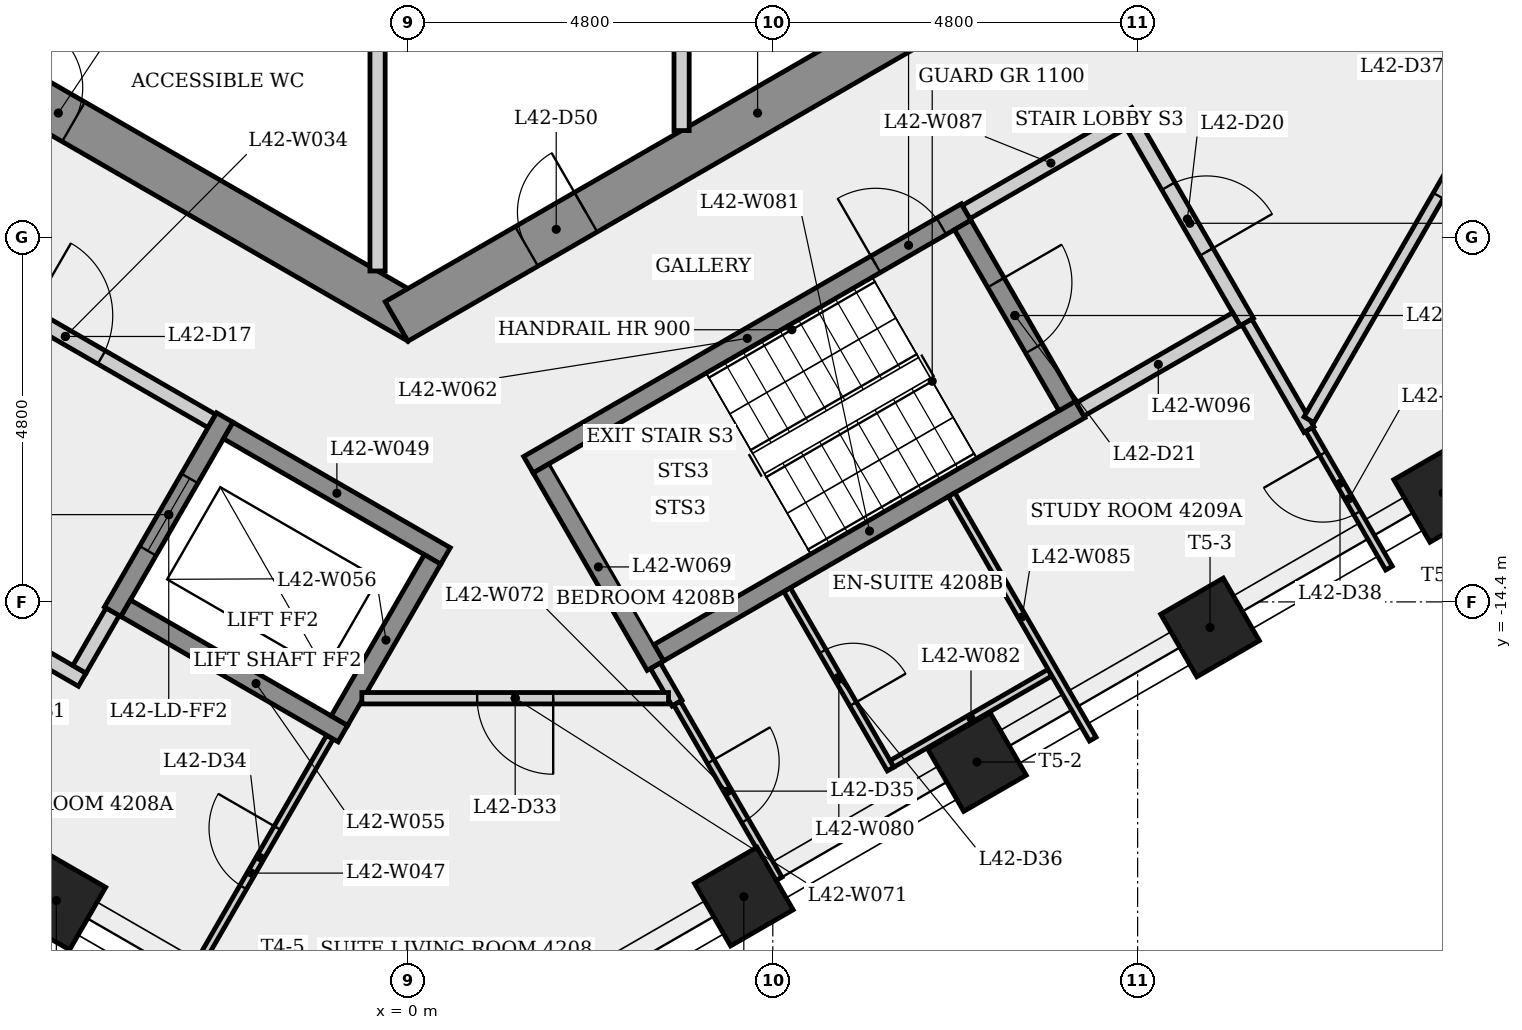
"""IFC4 building model, lengths in metres.
Left out: names, types, materials, properties, quantities, classifications, styles, units other than length and angle.
Written with IfcOpenShell. Run it as: python <this file> out.ifc"""

import sys

from ifc_helpers import new_model, si_unit, direction, frame, frame_2d, origin, origin_2d, place, context, subcontext, project, spatial, rectangle, extrude, element, fill, save


model = new_model("IFC4")
c1 = context("Model", 3, precision=1e-05, world=origin(), true_north=direction((0.0, 1.0)))
c2 = subcontext(c1, "Body", "Model", "MODEL_VIEW")
j1 = project(units=[si_unit("LENGTHUNIT", "METRE"), si_unit("PLANEANGLEUNIT", "RADIAN")], contexts=[c1])
p1 = place(None, origin())
s1 = spatial("IfcSite", under=j1, at=p1, CompositionType="ELEMENT")
p2 = place(p1, origin())
s2 = spatial("IfcBuilding", under=s1, at=p2, CompositionType="ELEMENT")
p3 = place(p2, frame((0.0, 0.0, 159.5)))
s3 = spatial("IfcBuildingStorey", under=s2, at=p3, CompositionType="ELEMENT", Elevation=159.5)
p4 = place(p3, frame((-9.35, -5.225, 0.0), z_axis=(0.0, 0.0, 1.0), x_axis=(0.866023993627, -0.500002442456, 0.0)))
e1 = element("IfcWall", 1, at=p4, inside=s3, PredefinedType="SHEAR", context=c2, shape_type="SweptSolid", body=[
    extrude(rectangle(XDim=10.97, YDim=0.6, at=frame_2d((5.485, 0.0))), origin(), (0.0, 0.0, 1.0), 3.4),
])
p5 = place(p4, frame((4.816, 0.0, 0.0)))
e2 = element("IfcOpeningElement", 2, at=p5, cuts=e1, PredefinedType="OPENING", context=c2, shape_type="SweptSolid", body=[
    extrude(rectangle(XDim=0.9, YDim=2.1, at=frame_2d((0.45, 1.05))), frame((0.0, 0.31, 0.0), z_axis=(0.0, -1.0, 0.0), x_axis=(1.0, 0.0, 0.0)), (0.0, 0.0, 1.0), 0.62),
])
p6 = place(p3, frame((-0.15, -10.71, 0.0), z_axis=(0.0, 0.0, 1.0), x_axis=(0.866023993627, 0.500002442456, 0.0)))
e3 = element("IfcWall", 3, at=p6, inside=s3, PredefinedType="SHEAR", context=c2, shape_type="SweptSolid", body=[
    extrude(rectangle(XDim=10.97, YDim=0.6, at=frame_2d((5.485, 0.0))), origin(), (0.0, 0.0, 1.0), 3.4),
])
p7 = place(p6, frame((1.975, 0.0, 0.0)))
e4 = element("IfcOpeningElement", 4, at=p7, cuts=e3, PredefinedType="OPENING", context=c2, shape_type="SweptSolid", body=[
    extrude(rectangle(XDim=0.9, YDim=2.1, at=frame_2d((0.45, 1.05))), frame((0.0, 0.31, 0.0), z_axis=(0.0, -1.0, 0.0), x_axis=(1.0, 0.0, 0.0)), (0.0, 0.0, 1.0), 0.62),
])
p8 = place(p6, frame((8.782, 0.0, 0.0)))
e5 = element("IfcOpeningElement", 5, at=p8, cuts=e3, PredefinedType="OPENING", context=c2, shape_type="SweptSolid", body=[
    extrude(rectangle(XDim=0.9, YDim=2.1, at=frame_2d((0.45, 1.05))), frame((0.0, 0.31, 0.0), z_axis=(0.0, -1.0, 0.0), x_axis=(1.0, 0.0, 0.0)), (0.0, 0.0, 1.0), 0.62),
])
for number, where, z_axis, x_axis in (
    (6, (-4.626, -18.329, 0.0), (0.0, 0.0, 1.0), (-0.5, -0.866, 0.0)),
    (7, (4.419, -18.278, 0.0), (0.0, 0.0, 1.0), (0.5, -0.866, 0.0)),
    (8, (7.486, -16.507, 0.0), (0.0, 0.0, 1.0), (0.5, -0.866, 0.0)),
    (9, (10.552, -14.736, 0.0), (0.0, 0.0, 1.0), (0.5, -0.866, 0.0)),
    (10, (13.62, -12.965, 0.0), (0.0, 0.0, 1.0), (0.5, -0.866, 0.0)),
):
    element("IfcColumn", number, at=place(p3, frame(where, z_axis=z_axis, x_axis=x_axis)), inside=s3, PredefinedType="COLUMN", context=c2, shape_type="SweptSolid", body=[
        extrude(rectangle(XDim=0.95, YDim=0.95, at=origin_2d()), origin(), (0.0, 0.0, 1.0), 3.4),
    ])
p9 = place(p3, frame((-6.435, -9.795, 0.0), z_axis=(0.0, 0.0, 1.0), x_axis=(0.866012907634, -0.500021643343, 0.0)))
e11 = element("IfcWall", 11, at=p9, inside=s3, PredefinedType="PARTITIONING", context=c2, shape_type="SweptSolid", body=[
    extrude(rectangle(XDim=4.45, YDim=0.2, at=frame_2d((2.225, 0.0))), origin(), (0.0, 0.0, 1.0), 3.05),
])
p10 = place(p9, frame((1.675, 0.0, 0.0)))
e12 = element("IfcOpeningElement", 12, at=p10, cuts=e11, PredefinedType="OPENING", context=c2, shape_type="SweptSolid", body=[
    extrude(rectangle(XDim=1.1, YDim=2.1, at=frame_2d((0.55, 1.05))), frame((0.0, 0.11, 0.0), z_axis=(0.0, -1.0, 0.0), x_axis=(1.0, 0.0, 0.0)), (0.0, 0.0, 1.0), 0.22),
])
p11 = place(p3, frame((-4.286, -15.423, 0.0), z_axis=(0.0, 0.0, 1.0), x_axis=(-0.866042777325, 0.499969906938, 0.0)))
e13 = element("IfcWall", 13, at=p11, inside=s3, PredefinedType="PARTITIONING", context=c2, shape_type="SweptSolid", body=[
    extrude(rectangle(XDim=3.9, YDim=0.2, at=frame_2d((1.95, 0.0))), origin(), (0.0, 0.0, 1.0), 3.05),
])
p12 = place(p3, frame((-3.885, -14.529, 0.0), z_axis=(0.0, 0.0, 1.0), x_axis=(-0.499859285417, -0.866106630146, 0.0)))
e14 = element("IfcWall", 14, at=p12, inside=s3, PredefinedType="PARTITIONING", context=c2, shape_type="SweptSolid", body=[
    extrude(rectangle(XDim=0.875, YDim=0.2, at=frame_2d((0.438, 0.0))), origin(), (0.0, 0.0, 1.0), 3.05),
])
p13 = place(p3, frame((-3.094, -19.758, 0.0), z_axis=(0.0, 0.0, 1.0), x_axis=(0.500027577057, 0.866009481578, 0.0)))
e15 = element("IfcWall", 15, at=p13, inside=s3, PredefinedType="PARTITIONING", context=c2, shape_type="SweptSolid", body=[
    extrude(rectangle(XDim=4.133, YDim=0.1, at=frame_2d((2.066, 0.0))), origin(), (0.0, 0.0, 1.0), 3.05),
])
p14 = place(p13, frame((1.852, 0.0, 0.0)))
e16 = element("IfcOpeningElement", 16, at=p14, cuts=e15, PredefinedType="OPENING", context=c2, shape_type="SweptSolid", body=[
    extrude(rectangle(XDim=0.9, YDim=2.1, at=frame_2d((0.45, 1.05))), frame((0.0, 0.06, 0.0), z_axis=(0.0, -1.0, 0.0), x_axis=(1.0, 0.0, 0.0)), (0.0, 0.0, 1.0), 0.12),
])
p15 = place(p3, frame((-2.41, -11.974, 0.0), z_axis=(0.0, 0.0, 1.0), x_axis=(-0.500001826776, -0.866024349092, 0.0)))
e17 = element("IfcWall", 17, at=p15, inside=s3, PredefinedType="SHEAR", context=c2, shape_type="SweptSolid", body=[
    extrude(rectangle(XDim=2.95, YDim=0.25, at=frame_2d((1.475, 0.0))), origin(), (0.0, 0.0, 1.0), 3.05),
])
p16 = place(p15, frame((0.925, 0.0, 0.0)))
e18 = element("IfcOpeningElement", 18, at=p16, cuts=e17, PredefinedType="OPENING", context=c2, shape_type="SweptSolid", body=[
    extrude(rectangle(XDim=1.1, YDim=2.1, at=frame_2d((0.55, 1.05))), frame((0.0, 0.135, 0.0), z_axis=(0.0, -1.0, 0.0), x_axis=(1.0, 0.0, 0.0)), (0.0, 0.0, 1.0), 0.27),
])
p17 = place(p3, frame((-2.364, -12.145, 0.0), z_axis=(0.0, 0.0, 1.0), x_axis=(0.866040211805, -0.499974350878, 0.0)))
e19 = element("IfcWall", 19, at=p17, inside=s3, PredefinedType="SHEAR", context=c2, shape_type="SweptSolid", body=[
    extrude(rectangle(XDim=3.3, YDim=0.25, at=frame_2d((1.65, 0.0))), origin(), (0.0, 0.0, 1.0), 3.05),
])
p18 = place(p3, frame((-0.856, -16.133, 0.0), z_axis=(0.0, 0.0, 1.0), x_axis=(-0.866021716278, 0.500006386895, 0.0)))
e20 = element("IfcWall", 20, at=p18, inside=s3, PredefinedType="SHEAR", context=c2, shape_type="SweptSolid", body=[
    extrude(rectangle(XDim=3.3, YDim=0.25, at=frame_2d((1.65, 0.0))), origin(), (0.0, 0.0, 1.0), 3.05),
])
p19 = place(p3, frame((-0.902, -15.962, 0.0), z_axis=(0.0, 0.0, 1.0), x_axis=(0.500061746146, 0.865989751695, 0.0)))
e21 = element("IfcWall", 21, at=p19, inside=s3, PredefinedType="SHEAR", context=c2, shape_type="SweptSolid", body=[
    extrude(rectangle(XDim=2.45, YDim=0.25, at=frame_2d((1.225, 0.0))), origin(), (0.0, 0.0, 1.0), 3.4),
])
p20 = place(p3, frame((-0.4, -5.25, 0.0), z_axis=(0.0, 0.0, 1.0), x_axis=(0.0, -1.0, 0.0)))
e22 = element("IfcWall", 22, at=p20, inside=s3, PredefinedType="PARTITIONING", context=c2, shape_type="SweptSolid", body=[
    extrude(rectangle(XDim=4.796, YDim=0.2, at=frame_2d((2.398, 0.0))), origin(), (0.0, 0.0, 1.0), 3.05),
])
p21 = place(p3, frame((1.585, -12.595, 0.0), z_axis=(0.0, 0.0, 1.0), x_axis=(0.866036417653, 0.499980922934, 0.0)))
e23 = element("IfcWall", 23, at=p21, inside=s3, PredefinedType="SHEAR", context=c2, shape_type="SweptSolid", body=[
    extrude(rectangle(XDim=6.65, YDim=0.25, at=frame_2d((3.325, 0.0))), origin(), (0.0, 0.0, 1.0), 3.05),
])
p22 = place(p21, frame((5.275, 0.0, 0.0)))
e24 = element("IfcOpeningElement", 24, at=p22, cuts=e23, PredefinedType="OPENING", context=c2, shape_type="SweptSolid", body=[
    extrude(rectangle(XDim=1.0, YDim=2.1, at=frame_2d((0.5, 1.05))), frame((0.0, 0.135, 0.0), z_axis=(0.0, -1.0, 0.0), x_axis=(1.0, 0.0, 0.0)), (0.0, 0.0, 1.0), 0.27),
])
p23 = place(p3, frame((3.256, -15.239, 0.0), z_axis=(0.0, 0.0, 1.0), x_axis=(0.49987077196, -0.866100000774, 0.0)))
e25 = element("IfcWall", 25, at=p23, inside=s3, PredefinedType="PARTITIONING", context=c2, shape_type="SweptSolid", body=[
    extrude(rectangle(XDim=0.57, YDim=0.15, at=frame_2d((0.285, 0.0))), origin(), (0.0, 0.0, 1.0), 3.05),
])
p24 = place(p3, frame((3.256, -15.239, 0.0), z_axis=(0.0, 0.0, 1.0), x_axis=(-0.50002537861, 0.866010750942, 0.0)))
e26 = element("IfcWall", 26, at=p24, inside=s3, PredefinedType="SHEAR", context=c2, shape_type="SweptSolid", body=[
    extrude(rectangle(XDim=3.0, YDim=0.25, at=frame_2d((1.5, 0.0))), origin(), (0.0, 0.0, 1.0), 3.05),
])
p25 = place(p3, frame((3.428, -15.667, 0.0), z_axis=(0.0, 0.0, 1.0), x_axis=(-1.0, 0.0, 0.0)))
e27 = element("IfcWall", 27, at=p25, inside=s3, PredefinedType="PARTITIONING", context=c2, shape_type="SweptSolid", body=[
    extrude(rectangle(XDim=4.035, YDim=0.15, at=frame_2d((2.017, 0.0))), origin(), (0.0, 0.0, 1.0), 3.05),
])
p26 = place(p25, frame((1.517, 0.0, 0.0)))
e28 = element("IfcOpeningElement", 28, at=p26, cuts=e27, PredefinedType="OPENING", context=c2, shape_type="SweptSolid", body=[
    extrude(rectangle(XDim=1.0, YDim=2.1, at=frame_2d((0.5, 1.05))), frame((0.0, 0.085, 0.0), z_axis=(0.0, -1.0, 0.0), x_axis=(1.0, 0.0, 0.0)), (0.0, 0.0, 1.0), 0.17),
])
p27 = place(p3, frame((3.541, -15.732, 0.0), z_axis=(0.0, 0.0, 1.0), x_axis=(0.500009734663, -0.866019783401, 0.0)))
e29 = element("IfcWall", 29, at=p27, inside=s3, PredefinedType="PARTITIONING", context=c2, shape_type="SweptSolid", body=[
    extrude(rectangle(XDim=2.673, YDim=0.1, at=frame_2d((1.336, 0.0))), origin(), (0.0, 0.0, 1.0), 3.05),
])
p28 = place(p27, frame((0.886, 0.0, 0.0)))
e30 = element("IfcOpeningElement", 30, at=p28, cuts=e29, PredefinedType="OPENING", context=c2, shape_type="SweptSolid", body=[
    extrude(rectangle(XDim=0.9, YDim=2.1, at=frame_2d((0.45, 1.05))), frame((0.0, 0.06, 0.0), z_axis=(0.0, -1.0, 0.0), x_axis=(1.0, 0.0, 0.0)), (0.0, 0.0, 1.0), 0.12),
])
p29 = place(p3, frame((3.6, -5.275, 0.0), z_axis=(0.0, 0.0, 1.0), x_axis=(0.0, -1.0, 0.0)))
e31 = element("IfcWall", 31, at=p29, inside=s3, PredefinedType="PARTITIONING", context=c2, shape_type="SweptSolid", body=[
    extrude(rectangle(XDim=2.924, YDim=0.2, at=frame_2d((1.462, 0.0))), origin(), (0.0, 0.0, 1.0), 3.05),
])
p30 = place(p3, frame((4.988, -14.239, 0.0), z_axis=(0.0, 0.0, 1.0), x_axis=(0.500022328685, -0.866012511928, 0.0)))
e32 = element("IfcWall", 32, at=p30, inside=s3, PredefinedType="PARTITIONING", context=c2, shape_type="SweptSolid", body=[
    extrude(rectangle(XDim=2.725, YDim=0.1, at=frame_2d((1.363, 0.0))), origin(), (0.0, 0.0, 1.0), 3.05),
])
p31 = place(p30, frame((0.938, 0.0, 0.0)))
e33 = element("IfcOpeningElement", 33, at=p31, cuts=e32, PredefinedType="OPENING", context=c2, shape_type="SweptSolid", body=[
    extrude(rectangle(XDim=0.8, YDim=2.1, at=frame_2d((0.4, 1.05))), frame((0.0, 0.06, 0.0), z_axis=(0.0, -1.0, 0.0), x_axis=(1.0, 0.0, 0.0)), (0.0, 0.0, 1.0), 0.12),
])
p32 = place(p3, frame((3.301, -15.068, 0.0), z_axis=(0.0, 0.0, 1.0), x_axis=(0.866035036182, 0.499983315828, 0.0)))
e34 = element("IfcWall", 34, at=p32, inside=s3, PredefinedType="SHEAR", context=c2, shape_type="SweptSolid", body=[
    extrude(rectangle(XDim=6.4, YDim=0.25, at=frame_2d((3.2, 0.0))), origin(), (0.0, 0.0, 1.0), 3.05),
])
p33 = place(p3, frame((6.368, -16.531, 0.0), z_axis=(0.0, 0.0, 1.0), x_axis=(0.866006032174, 0.500033551112, 0.0)))
e35 = element("IfcWall", 35, at=p33, inside=s3, PredefinedType="PARTITIONING", context=c2, shape_type="SweptSolid", body=[
    extrude(rectangle(XDim=2.4, YDim=0.1, at=frame_2d((1.2, 0.0))), origin(), (0.0, 0.0, 1.0), 3.05),
])
p34 = place(p3, frame((7.153, -12.989, 0.0), z_axis=(0.0, 0.0, 1.0), x_axis=(0.499999386358, -0.86602575807, 0.0)))
e36 = element("IfcWall", 36, at=p34, inside=s3, PredefinedType="PARTITIONING", context=c2, shape_type="SweptSolid", body=[
    extrude(rectangle(XDim=3.714, YDim=0.1, at=frame_2d((1.857, 0.0))), origin(), (0.0, 0.0, 1.0), 3.05),
])
p35 = place(p3, frame((7.298, -9.441, 0.0), z_axis=(0.0, 0.0, 1.0), x_axis=(0.500034990121, -0.866005201286, 0.0)))
e37 = element("IfcWall", 37, at=p35, inside=s3, PredefinedType="SHEAR", context=c2, shape_type="SweptSolid", body=[
    extrude(rectangle(XDim=2.75, YDim=0.25, at=frame_2d((1.375, 0.0))), origin(), (0.0, 0.0, 1.0), 3.05),
])
p36 = place(p35, frame((0.875, 0.0, 0.0)))
e38 = element("IfcOpeningElement", 38, at=p36, cuts=e37, PredefinedType="OPENING", context=c2, shape_type="SweptSolid", body=[
    extrude(rectangle(XDim=1.0, YDim=2.1, at=frame_2d((0.5, 1.05))), frame((0.0, 0.135, 0.0), z_axis=(0.0, -1.0, 0.0), x_axis=(1.0, 0.0, 0.0)), (0.0, 0.0, 1.0), 0.27),
])
p37 = place(p3, frame((7.344, -9.27, 0.0), z_axis=(0.0, 0.0, 1.0), x_axis=(0.866005588531, 0.500034319456, 0.0)))
e39 = element("IfcWall", 39, at=p37, inside=s3, PredefinedType="PARTITIONING", context=c2, shape_type="SweptSolid", body=[
    extrude(rectangle(XDim=2.575, YDim=0.2, at=frame_2d((1.288, 0.0))), origin(), (0.0, 0.0, 1.0), 3.05),
])
p38 = place(p3, frame((9.537, -8.119, 0.0), z_axis=(0.0, 0.0, 1.0), x_axis=(0.499990139034, -0.866031096941, 0.0)))
e40 = element("IfcWall", 40, at=p38, inside=s3, PredefinedType="PARTITIONING", context=c2, shape_type="SweptSolid", body=[
    extrude(rectangle(XDim=3.0, YDim=0.2, at=frame_2d((1.5, 0.0))), origin(), (0.0, 0.0, 1.0), 3.05),
])
p39 = place(p38, frame((0.935, 0.0, 0.0)))
e41 = element("IfcOpeningElement", 41, at=p39, cuts=e40, PredefinedType="OPENING", context=c2, shape_type="SweptSolid", body=[
    extrude(rectangle(XDim=1.0, YDim=2.1, at=frame_2d((0.5, 1.05))), frame((0.0, 0.11, 0.0), z_axis=(0.0, -1.0, 0.0), x_axis=(1.0, 0.0, 0.0)), (0.0, 0.0, 1.0), 0.22),
])
p40 = place(p3, frame((10.901, -10.681, 0.0), z_axis=(0.0, 0.0, 1.0), x_axis=(-0.866007538022, -0.500030943131, 0.0)))
e42 = element("IfcWall", 42, at=p40, inside=s3, PredefinedType="PARTITIONING", context=c2, shape_type="SweptSolid", body=[
    extrude(rectangle(XDim=2.375, YDim=0.2, at=frame_2d((1.188, 0.0))), origin(), (0.0, 0.0, 1.0), 3.05),
])
p41 = place(p3, frame((11.854, -12.132, 0.0), z_axis=(0.0, 0.0, 1.0), x_axis=(-0.499899205091, 0.866083589932, 0.0)))
e43 = element("IfcWall", 43, at=p41, inside=s3, PredefinedType="PARTITIONING", context=c2, shape_type="SweptSolid", body=[
    extrude(rectangle(XDim=1.634, YDim=0.15, at=frame_2d((0.817, 0.0))), origin(), (0.0, 0.0, 1.0), 3.05),
])
p42 = place(p3, frame((12.907, -13.955, 0.0), z_axis=(0.0, 0.0, 1.0), x_axis=(-0.50004374799, 0.866000144397, 0.0)))
e44 = element("IfcWall", 44, at=p42, inside=s3, PredefinedType="PARTITIONING", context=c2, shape_type="SweptSolid", body=[
    extrude(rectangle(XDim=2.105, YDim=0.1, at=frame_2d((1.052, 0.0))), origin(), (0.0, 0.0, 1.0), 3.05),
])
p43 = place(p42, frame((0.838, 0.0, 0.0)))
e45 = element("IfcOpeningElement", 45, at=p43, cuts=e44, PredefinedType="OPENING", context=c2, shape_type="SweptSolid", body=[
    extrude(rectangle(XDim=0.9, YDim=2.1, at=frame_2d((0.45, 1.05))), frame((0.0, 0.06, 0.0), z_axis=(0.0, -1.0, 0.0), x_axis=(1.0, 0.0, 0.0)), (0.0, 0.0, 1.0), 0.12),
])
p44 = place(p3, frame((15.757, -5.243, 0.0), z_axis=(0.0, 0.0, 1.0), x_axis=(-0.500001355988, -0.866024620903, 0.0)))
e46 = element("IfcWall", 46, at=p44, inside=s3, PredefinedType="PARTITIONING", context=c2, shape_type="SweptSolid", body=[
    extrude(rectangle(XDim=7.805, YDim=0.15, at=frame_2d((3.902, 0.0))), origin(), (0.0, 0.0, 1.0), 3.05),
])
p45 = place(p44, frame((3.402, 0.0, 0.0)))
e47 = element("IfcOpeningElement", 47, at=p45, cuts=e46, PredefinedType="OPENING", context=c2, shape_type="SweptSolid", body=[
    extrude(rectangle(XDim=1.0, YDim=2.1, at=frame_2d((0.5, 1.05))), frame((0.0, 0.085, 0.0), z_axis=(0.0, -1.0, 0.0), x_axis=(1.0, 0.0, 0.0)), (0.0, 0.0, 1.0), 0.17),
])
p46 = place(p10, origin())
e48 = element("IfcDoor", 48, at=p46, inside=s3, OperationType="SINGLE_SWING_LEFT", PredefinedType="DOOR", context=c2, shape_type="SweptSolid", body=[
    extrude(rectangle(XDim=1.1, YDim=2.1, at=frame_2d((0.55, 1.05))), frame((0.0, 0.025, 0.0), z_axis=(0.0, -1.0, 0.0), x_axis=(1.0, 0.0, 0.0)), (0.0, 0.0, 1.0), 0.05),
])
fill(e12, e48)
p47 = place(p16, origin())
e49 = element("IfcDoor", 49, at=p47, inside=s3, OperationType="SLIDING_TO_LEFT", PredefinedType="DOOR", context=c2, shape_type="SweptSolid", body=[
    extrude(rectangle(XDim=1.1, YDim=2.1, at=frame_2d((0.55, 1.05))), frame((0.0, 0.025, 0.0), z_axis=(0.0, -1.0, 0.0), x_axis=(1.0, 0.0, 0.0)), (0.0, 0.0, 1.0), 0.05),
])
fill(e18, e49)
p48 = place(p22, origin())
e50 = element("IfcDoor", 50, at=p48, inside=s3, OperationType="SINGLE_SWING_LEFT", PredefinedType="DOOR", context=c2, shape_type="SweptSolid", body=[
    extrude(rectangle(XDim=1.0, YDim=2.1, at=frame_2d((0.5, 1.05))), frame((0.0, 0.025, 0.0), z_axis=(0.0, -1.0, 0.0), x_axis=(1.0, 0.0, 0.0)), (0.0, 0.0, 1.0), 0.05),
])
fill(e24, e50)
p49 = place(p39, origin())
e51 = element("IfcDoor", 51, at=p49, inside=s3, OperationType="SINGLE_SWING_RIGHT", PredefinedType="DOOR", context=c2, shape_type="SweptSolid", body=[
    extrude(rectangle(XDim=1.0, YDim=2.1, at=frame_2d((0.5, 1.05))), frame((0.0, 0.025, 0.0), z_axis=(0.0, -1.0, 0.0), x_axis=(1.0, 0.0, 0.0)), (0.0, 0.0, 1.0), 0.05),
])
fill(e41, e51)
p50 = place(p36, origin())
e52 = element("IfcDoor", 52, at=p50, inside=s3, OperationType="SINGLE_SWING_LEFT", PredefinedType="DOOR", context=c2, shape_type="SweptSolid", body=[
    extrude(rectangle(XDim=1.0, YDim=2.1, at=frame_2d((0.5, 1.05))), frame((0.0, 0.025, 0.0), z_axis=(0.0, -1.0, 0.0), x_axis=(1.0, 0.0, 0.0)), (0.0, 0.0, 1.0), 0.05),
])
fill(e38, e52)
p51 = place(p26, origin())
e53 = element("IfcDoor", 53, at=p51, inside=s3, OperationType="SINGLE_SWING_LEFT", PredefinedType="DOOR", context=c2, shape_type="SweptSolid", body=[
    extrude(rectangle(XDim=1.0, YDim=2.1, at=frame_2d((0.5, 1.05))), frame((0.0, 0.025, 0.0), z_axis=(0.0, -1.0, 0.0), x_axis=(1.0, 0.0, 0.0)), (0.0, 0.0, 1.0), 0.05),
])
fill(e28, e53)
p52 = place(p14, origin())
e54 = element("IfcDoor", 54, at=p52, inside=s3, OperationType="SINGLE_SWING_RIGHT", PredefinedType="DOOR", context=c2, shape_type="SweptSolid", body=[
    extrude(rectangle(XDim=0.9, YDim=2.1, at=frame_2d((0.45, 1.05))), frame((0.0, 0.025, 0.0), z_axis=(0.0, -1.0, 0.0), x_axis=(1.0, 0.0, 0.0)), (0.0, 0.0, 1.0), 0.05),
])
fill(e16, e54)
p53 = place(p28, origin())
e55 = element("IfcDoor", 55, at=p53, inside=s3, OperationType="SINGLE_SWING_LEFT", PredefinedType="DOOR", context=c2, shape_type="SweptSolid", body=[
    extrude(rectangle(XDim=0.9, YDim=2.1, at=frame_2d((0.45, 1.05))), frame((0.0, 0.025, 0.0), z_axis=(0.0, -1.0, 0.0), x_axis=(1.0, 0.0, 0.0)), (0.0, 0.0, 1.0), 0.05),
])
fill(e30, e55)
p54 = place(p31, origin())
e56 = element("IfcDoor", 56, at=p54, inside=s3, OperationType="SINGLE_SWING_RIGHT", PredefinedType="DOOR", context=c2, shape_type="SweptSolid", body=[
    extrude(rectangle(XDim=0.8, YDim=2.1, at=frame_2d((0.4, 1.05))), frame((0.0, 0.025, 0.0), z_axis=(0.0, -1.0, 0.0), x_axis=(1.0, 0.0, 0.0)), (0.0, 0.0, 1.0), 0.05),
])
fill(e33, e56)
p55 = place(p45, origin())
e57 = element("IfcDoor", 57, at=p55, inside=s3, OperationType="SINGLE_SWING_LEFT", PredefinedType="DOOR", context=c2, shape_type="SweptSolid", body=[
    extrude(rectangle(XDim=1.0, YDim=2.1, at=frame_2d((0.5, 1.05))), frame((0.0, 0.025, 0.0), z_axis=(0.0, -1.0, 0.0), x_axis=(1.0, 0.0, 0.0)), (0.0, 0.0, 1.0), 0.05),
])
fill(e47, e57)
p56 = place(p43, origin())
e58 = element("IfcDoor", 58, at=p56, inside=s3, OperationType="SINGLE_SWING_RIGHT", PredefinedType="DOOR", context=c2, shape_type="SweptSolid", body=[
    extrude(rectangle(XDim=0.9, YDim=2.1, at=frame_2d((0.45, 1.05))), frame((0.0, 0.025, 0.0), z_axis=(0.0, -1.0, 0.0), x_axis=(1.0, 0.0, 0.0)), (0.0, 0.0, 1.0), 0.05),
])
fill(e45, e58)
p57 = place(p5, origin())
e59 = element("IfcDoor", 59, at=p57, inside=s3, OperationType="SINGLE_SWING_LEFT", PredefinedType="DOOR", context=c2, shape_type="SweptSolid", body=[
    extrude(rectangle(XDim=0.9, YDim=2.1, at=frame_2d((0.45, 1.05))), frame((0.0, 0.025, 0.0), z_axis=(0.0, -1.0, 0.0), x_axis=(1.0, 0.0, 0.0)), (0.0, 0.0, 1.0), 0.05),
])
fill(e2, e59)
p58 = place(p7, origin())
e60 = element("IfcDoor", 60, at=p58, inside=s3, OperationType="SINGLE_SWING_RIGHT", PredefinedType="DOOR", context=c2, shape_type="SweptSolid", body=[
    extrude(rectangle(XDim=0.9, YDim=2.1, at=frame_2d((0.45, 1.05))), frame((0.0, 0.025, 0.0), z_axis=(0.0, -1.0, 0.0), x_axis=(1.0, 0.0, 0.0)), (0.0, 0.0, 1.0), 0.05),
])
fill(e4, e60)
save(model, sys.argv[1])
